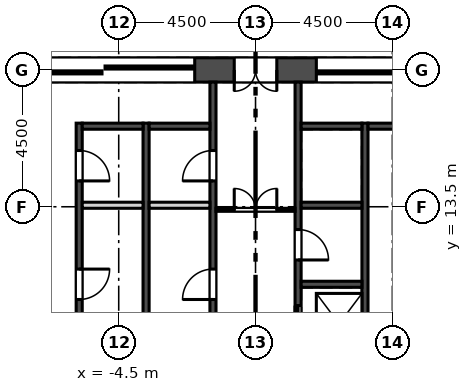
"""IFC4 building model, lengths in metres.
Left out: names, types, materials, properties, quantities, classifications, styles, units other than length and angle.
Written with IfcOpenShell. Run it as: python <this file> out.ifc"""

import sys

from ifc_helpers import new_model, si_unit, direction, frame, frame_2d, origin, place, context, subcontext, project, spatial, rectangle, extrude, element, fill, save


model = new_model("IFC4")
c1 = context("Model", 3, precision=1e-05, world=origin(), true_north=direction((0.0, 1.0)))
c2 = subcontext(c1, "Body", "Model", "MODEL_VIEW")
j1 = project(units=[si_unit("LENGTHUNIT", "METRE"), si_unit("PLANEANGLEUNIT", "RADIAN")], contexts=[c1])
p1 = place(None, origin())
s1 = spatial("IfcSite", under=j1, at=p1, CompositionType="ELEMENT")
p2 = place(p1, origin())
s2 = spatial("IfcBuilding", under=s1, at=p2, CompositionType="ELEMENT")
p3 = place(p2, frame((0.0, 0.0, 335.1)))
s3 = spatial("IfcBuildingStorey", under=s2, at=p3, CompositionType="ELEMENT", Elevation=335.1)
p4 = place(p3, frame((9.065, 18.0, 0.0), z_axis=(0.0, 0.0, 1.0), x_axis=(-1.0, 0.0, 0.0)))
e1 = element("IfcWall", 1, at=p4, inside=s3, PredefinedType="SHEAR", context=c2, shape_type="SweptSolid", body=[
    extrude(rectangle(XDim=18.13, YDim=0.8, at=frame_2d((9.065, 0.0))), origin(), (0.0, 0.0, 1.0), 4.2),
])
p5 = place(p4, frame((8.365, 0.0, 0.0)))
e2 = element("IfcOpeningElement", 2, at=p5, cuts=e1, PredefinedType="OPENING", context=c2, shape_type="SweptSolid", body=[
    extrude(rectangle(XDim=1.4, YDim=2.1, at=frame_2d((0.7, 1.05))), frame((0.0, 0.41, 0.0), z_axis=(0.0, -1.0, 0.0), x_axis=(1.0, 0.0, 0.0)), (0.0, 0.0, 1.0), 0.82),
])
p6 = place(p4, frame((11.065, 0.0, 0.0)))
e3 = element("IfcOpeningElement", 3, at=p6, cuts=e1, PredefinedType="OPENING", context=c2, shape_type="SweptSolid", body=[
    extrude(rectangle(XDim=6.0, YDim=2.4, at=frame_2d((3.0, 1.2))), frame((0.0, 0.41, 0.0), z_axis=(0.0, -1.0, 0.0), x_axis=(1.0, 0.0, 0.0)), (0.0, 0.0, 1.0), 0.82),
])
p7 = place(p4, frame((1.065, 0.0, 0.0)))
e4 = element("IfcOpeningElement", 4, at=p7, cuts=e1, PredefinedType="OPENING", context=c2, shape_type="SweptSolid", body=[
    extrude(rectangle(XDim=6.0, YDim=2.4, at=frame_2d((3.0, 1.2))), frame((0.0, 0.41, 0.0), z_axis=(0.0, -1.0, 0.0), x_axis=(1.0, 0.0, 0.0)), (0.0, 0.0, 1.0), 0.82),
])
p8 = place(p3, frame((23.788, 7.709, 0.0), z_axis=(0.0, 0.0, 1.0), x_axis=(-0.500001731347, 0.866024404189, 0.0)))
e5 = element("IfcWall", 5, at=p8, inside=s3, PredefinedType="SOLIDWALL", context=c2, shape_type="SweptSolid", body=[
    extrude(rectangle(XDim=38.87, YDim=0.34, at=frame_2d((19.435, 0.0))), origin(), (0.0, 0.0, 1.0), 3.8),
])
p9 = place(p8, frame((3.218, 0.0, 0.9)))
e6 = element("IfcOpeningElement", 6, at=p9, cuts=e5, PredefinedType="OPENING", context=c2, shape_type="SweptSolid", body=[
    extrude(rectangle(XDim=1.885, YDim=2.6, at=frame_2d((0.942, 1.3))), frame((0.0, 0.18, 0.0), z_axis=(0.0, -1.0, 0.0), x_axis=(1.0, 0.0, 0.0)), (0.0, 0.0, 1.0), 0.36),
])
p10 = place(p8, frame((6.218, 0.0, 0.9)))
e7 = element("IfcOpeningElement", 7, at=p10, cuts=e5, PredefinedType="OPENING", context=c2, shape_type="SweptSolid", body=[
    extrude(rectangle(XDim=1.885, YDim=2.6, at=frame_2d((0.942, 1.3))), frame((0.0, 0.18, 0.0), z_axis=(0.0, -1.0, 0.0), x_axis=(1.0, 0.0, 0.0)), (0.0, 0.0, 1.0), 0.36),
])
p11 = place(p8, frame((9.218, 0.0, 0.9)))
e8 = element("IfcOpeningElement", 8, at=p11, cuts=e5, PredefinedType="OPENING", context=c2, shape_type="SweptSolid", body=[
    extrude(rectangle(XDim=1.885, YDim=2.6, at=frame_2d((0.942, 1.3))), frame((0.0, 0.18, 0.0), z_axis=(0.0, -1.0, 0.0), x_axis=(1.0, 0.0, 0.0)), (0.0, 0.0, 1.0), 0.36),
])
p12 = place(p8, frame((12.218, 0.0, 0.9)))
e9 = element("IfcOpeningElement", 9, at=p12, cuts=e5, PredefinedType="OPENING", context=c2, shape_type="SweptSolid", body=[
    extrude(rectangle(XDim=1.885, YDim=2.6, at=frame_2d((0.942, 1.3))), frame((0.0, 0.18, 0.0), z_axis=(0.0, -1.0, 0.0), x_axis=(1.0, 0.0, 0.0)), (0.0, 0.0, 1.0), 0.36),
])
p13 = place(p8, frame((15.218, 0.0, 0.9)))
e10 = element("IfcOpeningElement", 10, at=p13, cuts=e5, PredefinedType="OPENING", context=c2, shape_type="SweptSolid", body=[
    extrude(rectangle(XDim=1.885, YDim=2.6, at=frame_2d((0.942, 1.3))), frame((0.0, 0.18, 0.0), z_axis=(0.0, -1.0, 0.0), x_axis=(1.0, 0.0, 0.0)), (0.0, 0.0, 1.0), 0.36),
])
p14 = place(p8, frame((18.218, 0.0, 0.9)))
e11 = element("IfcOpeningElement", 11, at=p14, cuts=e5, PredefinedType="OPENING", context=c2, shape_type="SweptSolid", body=[
    extrude(rectangle(XDim=1.885, YDim=2.6, at=frame_2d((0.942, 1.3))), frame((0.0, 0.18, 0.0), z_axis=(0.0, -1.0, 0.0), x_axis=(1.0, 0.0, 0.0)), (0.0, 0.0, 1.0), 0.36),
])
p15 = place(p8, frame((21.218, 0.0, 0.9)))
e12 = element("IfcOpeningElement", 12, at=p15, cuts=e5, PredefinedType="OPENING", context=c2, shape_type="SweptSolid", body=[
    extrude(rectangle(XDim=1.885, YDim=2.6, at=frame_2d((0.942, 1.3))), frame((0.0, 0.18, 0.0), z_axis=(0.0, -1.0, 0.0), x_axis=(1.0, 0.0, 0.0)), (0.0, 0.0, 1.0), 0.36),
])
p16 = place(p8, frame((24.218, 0.0, 0.9)))
e13 = element("IfcOpeningElement", 13, at=p16, cuts=e5, PredefinedType="OPENING", context=c2, shape_type="SweptSolid", body=[
    extrude(rectangle(XDim=1.885, YDim=2.6, at=frame_2d((0.942, 1.3))), frame((0.0, 0.18, 0.0), z_axis=(0.0, -1.0, 0.0), x_axis=(1.0, 0.0, 0.0)), (0.0, 0.0, 1.0), 0.36),
])
p17 = place(p8, frame((27.218, 0.0, 0.9)))
e14 = element("IfcOpeningElement", 14, at=p17, cuts=e5, PredefinedType="OPENING", context=c2, shape_type="SweptSolid", body=[
    extrude(rectangle(XDim=1.885, YDim=2.6, at=frame_2d((0.942, 1.3))), frame((0.0, 0.18, 0.0), z_axis=(0.0, -1.0, 0.0), x_axis=(1.0, 0.0, 0.0)), (0.0, 0.0, 1.0), 0.36),
])
p18 = place(p8, frame((30.218, 0.0, 0.9)))
e15 = element("IfcOpeningElement", 15, at=p18, cuts=e5, PredefinedType="OPENING", context=c2, shape_type="SweptSolid", body=[
    extrude(rectangle(XDim=1.885, YDim=2.6, at=frame_2d((0.942, 1.3))), frame((0.0, 0.18, 0.0), z_axis=(0.0, -1.0, 0.0), x_axis=(1.0, 0.0, 0.0)), (0.0, 0.0, 1.0), 0.36),
])
p19 = place(p8, frame((33.218, 0.0, 0.9)))
e16 = element("IfcOpeningElement", 16, at=p19, cuts=e5, PredefinedType="OPENING", context=c2, shape_type="SweptSolid", body=[
    extrude(rectangle(XDim=1.885, YDim=2.6, at=frame_2d((0.942, 1.3))), frame((0.0, 0.18, 0.0), z_axis=(0.0, -1.0, 0.0), x_axis=(1.0, 0.0, 0.0)), (0.0, 0.0, 1.0), 0.36),
])
p20 = place(p8, frame((1.051, 0.0, 0.9)))
e17 = element("IfcOpeningElement", 17, at=p20, cuts=e5, PredefinedType="OPENING", context=c2, shape_type="SweptSolid", body=[
    extrude(rectangle(XDim=1.115, YDim=2.4, at=frame_2d((0.558, 1.2))), frame((0.0, 0.18, 0.0), z_axis=(0.0, -1.0, 0.0), x_axis=(1.0, 0.0, 0.0)), (0.0, 0.0, 1.0), 0.36),
])
p21 = place(p8, frame((36.429, 0.0, 0.9)))
e18 = element("IfcOpeningElement", 18, at=p21, cuts=e5, PredefinedType="OPENING", context=c2, shape_type="SweptSolid", body=[
    extrude(rectangle(XDim=1.115, YDim=2.4, at=frame_2d((0.558, 1.2))), frame((0.0, 0.18, 0.0), z_axis=(0.0, -1.0, 0.0), x_axis=(1.0, 0.0, 0.0)), (0.0, 0.0, 1.0), 0.36),
])
p22 = place(p3, frame((-4.353, 41.372, 0.0), z_axis=(0.0, 0.0, 1.0), x_axis=(-0.500001731347, -0.866024404189, 0.0)))
e19 = element("IfcWall", 19, at=p22, inside=s3, PredefinedType="SOLIDWALL", context=c2, shape_type="SweptSolid", body=[
    extrude(rectangle(XDim=38.87, YDim=0.34, at=frame_2d((19.435, 0.0))), origin(), (0.0, 0.0, 1.0), 3.8),
])
p23 = place(p22, frame((3.653, 0.0, 0.9)))
e20 = element("IfcOpeningElement", 20, at=p23, cuts=e19, PredefinedType="OPENING", context=c2, shape_type="SweptSolid", body=[
    extrude(rectangle(XDim=1.885, YDim=2.6, at=frame_2d((0.942, 1.3))), frame((0.0, 0.18, 0.0), z_axis=(0.0, -1.0, 0.0), x_axis=(1.0, 0.0, 0.0)), (0.0, 0.0, 1.0), 0.36),
])
p24 = place(p22, frame((6.653, 0.0, 0.9)))
e21 = element("IfcOpeningElement", 21, at=p24, cuts=e19, PredefinedType="OPENING", context=c2, shape_type="SweptSolid", body=[
    extrude(rectangle(XDim=1.885, YDim=2.6, at=frame_2d((0.942, 1.3))), frame((0.0, 0.18, 0.0), z_axis=(0.0, -1.0, 0.0), x_axis=(1.0, 0.0, 0.0)), (0.0, 0.0, 1.0), 0.36),
])
p25 = place(p22, frame((9.653, 0.0, 0.9)))
e22 = element("IfcOpeningElement", 22, at=p25, cuts=e19, PredefinedType="OPENING", context=c2, shape_type="SweptSolid", body=[
    extrude(rectangle(XDim=1.885, YDim=2.6, at=frame_2d((0.942, 1.3))), frame((0.0, 0.18, 0.0), z_axis=(0.0, -1.0, 0.0), x_axis=(1.0, 0.0, 0.0)), (0.0, 0.0, 1.0), 0.36),
])
p26 = place(p22, frame((12.653, 0.0, 0.9)))
e23 = element("IfcOpeningElement", 23, at=p26, cuts=e19, PredefinedType="OPENING", context=c2, shape_type="SweptSolid", body=[
    extrude(rectangle(XDim=1.885, YDim=2.6, at=frame_2d((0.942, 1.3))), frame((0.0, 0.18, 0.0), z_axis=(0.0, -1.0, 0.0), x_axis=(1.0, 0.0, 0.0)), (0.0, 0.0, 1.0), 0.36),
])
p27 = place(p22, frame((15.653, 0.0, 0.9)))
e24 = element("IfcOpeningElement", 24, at=p27, cuts=e19, PredefinedType="OPENING", context=c2, shape_type="SweptSolid", body=[
    extrude(rectangle(XDim=1.885, YDim=2.6, at=frame_2d((0.942, 1.3))), frame((0.0, 0.18, 0.0), z_axis=(0.0, -1.0, 0.0), x_axis=(1.0, 0.0, 0.0)), (0.0, 0.0, 1.0), 0.36),
])
p28 = place(p22, frame((18.653, 0.0, 0.9)))
e25 = element("IfcOpeningElement", 25, at=p28, cuts=e19, PredefinedType="OPENING", context=c2, shape_type="SweptSolid", body=[
    extrude(rectangle(XDim=1.885, YDim=2.6, at=frame_2d((0.942, 1.3))), frame((0.0, 0.18, 0.0), z_axis=(0.0, -1.0, 0.0), x_axis=(1.0, 0.0, 0.0)), (0.0, 0.0, 1.0), 0.36),
])
p29 = place(p22, frame((21.653, 0.0, 0.9)))
e26 = element("IfcOpeningElement", 26, at=p29, cuts=e19, PredefinedType="OPENING", context=c2, shape_type="SweptSolid", body=[
    extrude(rectangle(XDim=1.885, YDim=2.6, at=frame_2d((0.942, 1.3))), frame((0.0, 0.18, 0.0), z_axis=(0.0, -1.0, 0.0), x_axis=(1.0, 0.0, 0.0)), (0.0, 0.0, 1.0), 0.36),
])
p30 = place(p22, frame((24.653, 0.0, 0.9)))
e27 = element("IfcOpeningElement", 27, at=p30, cuts=e19, PredefinedType="OPENING", context=c2, shape_type="SweptSolid", body=[
    extrude(rectangle(XDim=1.885, YDim=2.6, at=frame_2d((0.942, 1.3))), frame((0.0, 0.18, 0.0), z_axis=(0.0, -1.0, 0.0), x_axis=(1.0, 0.0, 0.0)), (0.0, 0.0, 1.0), 0.36),
])
p31 = place(p22, frame((27.653, 0.0, 0.9)))
e28 = element("IfcOpeningElement", 28, at=p31, cuts=e19, PredefinedType="OPENING", context=c2, shape_type="SweptSolid", body=[
    extrude(rectangle(XDim=1.885, YDim=2.6, at=frame_2d((0.942, 1.3))), frame((0.0, 0.18, 0.0), z_axis=(0.0, -1.0, 0.0), x_axis=(1.0, 0.0, 0.0)), (0.0, 0.0, 1.0), 0.36),
])
p32 = place(p22, frame((30.653, 0.0, 0.9)))
e29 = element("IfcOpeningElement", 29, at=p32, cuts=e19, PredefinedType="OPENING", context=c2, shape_type="SweptSolid", body=[
    extrude(rectangle(XDim=1.885, YDim=2.6, at=frame_2d((0.942, 1.3))), frame((0.0, 0.18, 0.0), z_axis=(0.0, -1.0, 0.0), x_axis=(1.0, 0.0, 0.0)), (0.0, 0.0, 1.0), 0.36),
])
p33 = place(p22, frame((33.653, 0.0, 0.9)))
e30 = element("IfcOpeningElement", 30, at=p33, cuts=e19, PredefinedType="OPENING", context=c2, shape_type="SweptSolid", body=[
    extrude(rectangle(XDim=1.885, YDim=2.6, at=frame_2d((0.942, 1.3))), frame((0.0, 0.18, 0.0), z_axis=(0.0, -1.0, 0.0), x_axis=(1.0, 0.0, 0.0)), (0.0, 0.0, 1.0), 0.36),
])
p34 = place(p22, frame((1.269, 0.0, 0.9)))
e31 = element("IfcOpeningElement", 31, at=p34, cuts=e19, PredefinedType="OPENING", context=c2, shape_type="SweptSolid", body=[
    extrude(rectangle(XDim=1.115, YDim=2.4, at=frame_2d((0.558, 1.2))), frame((0.0, 0.18, 0.0), z_axis=(0.0, -1.0, 0.0), x_axis=(1.0, 0.0, 0.0)), (0.0, 0.0, 1.0), 0.36),
])
p35 = place(p22, frame((36.646, 0.0, 0.9)))
e32 = element("IfcOpeningElement", 32, at=p35, cuts=e19, PredefinedType="OPENING", context=c2, shape_type="SweptSolid", body=[
    extrude(rectangle(XDim=1.115, YDim=2.4, at=frame_2d((0.558, 1.2))), frame((0.0, 0.18, 0.0), z_axis=(0.0, -1.0, 0.0), x_axis=(1.0, 0.0, 0.0)), (0.0, 0.0, 1.0), 0.36),
])
p36 = place(p3, frame((-5.8, 8.25, -0.4), z_axis=(0.0, 0.0, 1.0), x_axis=(0.0, 1.0, 0.0)))
e33 = element("IfcWall", 33, at=p36, inside=s3, PredefinedType="SOLIDWALL", context=c2, shape_type="SweptSolid", body=[
    extrude(rectangle(XDim=8.0, YDim=0.2, at=frame_2d((4.0, 0.0))), origin(), (0.0, 0.0, 1.0), 4.2),
])
p37 = place(p36, frame((2.2, 0.0, 0.4)))
e34 = element("IfcOpeningElement", 34, at=p37, cuts=e33, PredefinedType="OPENING", context=c2, shape_type="SweptSolid", body=[
    extrude(rectangle(XDim=1.0, YDim=2.1, at=frame_2d((0.5, 1.05))), frame((0.0, 0.11, 0.0), z_axis=(0.0, -1.0, 0.0), x_axis=(1.0, 0.0, 0.0)), (0.0, 0.0, 1.0), 0.22),
])
p38 = place(p36, frame((6.1, 0.0, 0.4)))
e35 = element("IfcOpeningElement", 35, at=p38, cuts=e33, PredefinedType="OPENING", context=c2, shape_type="SweptSolid", body=[
    extrude(rectangle(XDim=1.0, YDim=2.1, at=frame_2d((0.5, 1.05))), frame((0.0, 0.11, 0.0), z_axis=(0.0, -1.0, 0.0), x_axis=(1.0, 0.0, 0.0)), (0.0, 0.0, 1.0), 0.22),
])
for number, where, z_axis, x_axis in (
    (36, (-3.6, 8.45, -0.4), (0.0, 0.0, 1.0), (0.0, 1.0, 0.0)),
    (37, (3.6, 8.45, -0.4), (0.0, 0.0, 1.0), (0.0, 1.0, 0.0)),
):
    element("IfcWall", number, at=place(p3, frame(where, z_axis=z_axis, x_axis=x_axis)), inside=s3, PredefinedType="SOLIDWALL", context=c2, shape_type="SweptSolid", body=[
        extrude(rectangle(XDim=7.8, YDim=0.2, at=frame_2d((3.9, 0.0))), origin(), (0.0, 0.0, 1.0), 4.2),
    ])
p39 = place(p3, frame((-1.4, 5.85, -0.4), z_axis=(0.0, 0.0, 1.0), x_axis=(0.0, 1.0, 0.0)))
e38 = element("IfcWall", 38, at=p39, inside=s3, PredefinedType="SOLIDWALL", context=c2, shape_type="SweptSolid", body=[
    extrude(rectangle(XDim=11.75, YDim=0.2, at=frame_2d((5.875, 0.0))), origin(), (0.0, 0.0, 1.0), 4.2),
])
p40 = place(p39, frame((0.65, 0.0, 0.4)))
e39 = element("IfcOpeningElement", 39, at=p40, cuts=e38, PredefinedType="OPENING", context=c2, shape_type="SweptSolid", body=[
    extrude(rectangle(XDim=1.1, YDim=2.1, at=frame_2d((0.55, 1.05))), frame((0.0, 0.11, 0.0), z_axis=(0.0, -1.0, 0.0), x_axis=(1.0, 0.0, 0.0)), (0.0, 0.0, 1.0), 0.22),
])
p41 = place(p39, frame((4.6, 0.0, 0.4)))
e40 = element("IfcOpeningElement", 40, at=p41, cuts=e38, PredefinedType="OPENING", context=c2, shape_type="SweptSolid", body=[
    extrude(rectangle(XDim=1.0, YDim=2.1, at=frame_2d((0.5, 1.05))), frame((0.0, 0.11, 0.0), z_axis=(0.0, -1.0, 0.0), x_axis=(1.0, 0.0, 0.0)), (0.0, 0.0, 1.0), 0.22),
])
p42 = place(p39, frame((8.5, 0.0, 0.4)))
e41 = element("IfcOpeningElement", 41, at=p42, cuts=e38, PredefinedType="OPENING", context=c2, shape_type="SweptSolid", body=[
    extrude(rectangle(XDim=1.0, YDim=2.1, at=frame_2d((0.5, 1.05))), frame((0.0, 0.11, 0.0), z_axis=(0.0, -1.0, 0.0), x_axis=(1.0, 0.0, 0.0)), (0.0, 0.0, 1.0), 0.22),
])
p43 = place(p3, frame((1.4, 5.85, -0.4), z_axis=(0.0, 0.0, 1.0), x_axis=(0.0, 1.0, 0.0)))
e42 = element("IfcWall", 42, at=p43, inside=s3, PredefinedType="SOLIDWALL", context=c2, shape_type="SweptSolid", body=[
    extrude(rectangle(XDim=11.75, YDim=0.2, at=frame_2d((5.875, 0.0))), origin(), (0.0, 0.0, 1.0), 4.2),
])
p44 = place(p43, frame((3.2, 0.0, 0.4)))
e43 = element("IfcOpeningElement", 43, at=p44, cuts=e42, PredefinedType="OPENING", context=c2, shape_type="SweptSolid", body=[
    extrude(rectangle(XDim=1.2, YDim=2.1, at=frame_2d((0.6, 1.05))), frame((0.0, 0.11, 0.0), z_axis=(0.0, -1.0, 0.0), x_axis=(1.0, 0.0, 0.0)), (0.0, 0.0, 1.0), 0.22),
])
p45 = place(p43, frame((0.65, 0.0, 0.4)))
e44 = element("IfcOpeningElement", 44, at=p45, cuts=e42, PredefinedType="OPENING", context=c2, shape_type="SweptSolid", body=[
    extrude(rectangle(XDim=1.1, YDim=2.1, at=frame_2d((0.55, 1.05))), frame((0.0, 0.11, 0.0), z_axis=(0.0, -1.0, 0.0), x_axis=(1.0, 0.0, 0.0)), (0.0, 0.0, 1.0), 0.22),
])
p46 = place(p43, frame((5.9, 0.0, 0.4)))
e45 = element("IfcOpeningElement", 45, at=p46, cuts=e42, PredefinedType="OPENING", context=c2, shape_type="SweptSolid", body=[
    extrude(rectangle(XDim=1.0, YDim=2.1, at=frame_2d((0.5, 1.05))), frame((0.0, 0.11, 0.0), z_axis=(0.0, -1.0, 0.0), x_axis=(1.0, 0.0, 0.0)), (0.0, 0.0, 1.0), 0.22),
])
p47 = place(p3, frame((-5.7, 13.55, 0.0), z_axis=(0.0, 0.0, 1.0), x_axis=(1.0, 0.0, 0.0)))
e46 = element("IfcWall", 46, at=p47, inside=s3, PredefinedType="SOLIDWALL", context=c2, shape_type="SweptSolid", body=[
    extrude(rectangle(XDim=2.0, YDim=0.2, at=frame_2d((1.0, 0.0))), origin(), (0.0, 0.0, 1.0), 3.8),
])
p48 = place(p3, frame((-5.7, 16.15, -0.4), z_axis=(0.0, 0.0, 1.0), x_axis=(1.0, 0.0, 0.0)))
e47 = element("IfcWall", 47, at=p48, inside=s3, PredefinedType="SOLIDWALL", context=c2, shape_type="SweptSolid", body=[
    extrude(rectangle(XDim=2.0, YDim=0.2, at=frame_2d((1.0, 0.0))), origin(), (0.0, 0.0, 1.0), 4.2),
])
p49 = place(p3, frame((-3.5, 13.55, 0.0), z_axis=(0.0, 0.0, 1.0), x_axis=(1.0, 0.0, 0.0)))
e48 = element("IfcWall", 48, at=p49, inside=s3, PredefinedType="SOLIDWALL", context=c2, shape_type="SweptSolid", body=[
    extrude(rectangle(XDim=2.0, YDim=0.2, at=frame_2d((1.0, 0.0))), origin(), (0.0, 0.0, 1.0), 3.8),
])
for number, where, z_axis, x_axis in (
    (49, (-3.5, 16.15, -0.4), (0.0, 0.0, 1.0), (1.0, 0.0, 0.0)),
    (50, (3.7, 16.15, -0.4), (0.0, 0.0, 1.0), (1.0, 0.0, 0.0)),
    (51, (1.5, 10.95, -0.4), (0.0, 0.0, 1.0), (1.0, 0.0, 0.0)),
    (52, (1.5, 13.55, -0.4), (0.0, 0.0, 1.0), (1.0, 0.0, 0.0)),
    (53, (1.5, 16.15, -0.4), (0.0, 0.0, 1.0), (1.0, 0.0, 0.0)),
):
    element("IfcWall", number, at=place(p3, frame(where, z_axis=z_axis, x_axis=x_axis)), inside=s3, PredefinedType="SOLIDWALL", context=c2, shape_type="SweptSolid", body=[
        extrude(rectangle(XDim=2.0, YDim=0.2, at=frame_2d((1.0, 0.0))), origin(), (0.0, 0.0, 1.0), 4.2),
    ])
p50 = place(p3, frame((-1.3, 13.4, 0.0), z_axis=(0.0, 0.0, 1.0), x_axis=(1.0, 0.0, 0.0)))
e54 = element("IfcWall", 54, at=p50, inside=s3, PredefinedType="PARTITIONING", context=c2, shape_type="SweptSolid", body=[
    extrude(rectangle(XDim=2.6, YDim=0.1, at=frame_2d((1.3, 0.0))), origin(), (0.0, 0.0, 1.0), 3.8),
])
p51 = place(p50, frame((0.6, 0.0, 0.0)))
e55 = element("IfcOpeningElement", 55, at=p51, cuts=e54, PredefinedType="OPENING", context=c2, shape_type="SweptSolid", body=[
    extrude(rectangle(XDim=1.4, YDim=2.1, at=frame_2d((0.7, 1.05))), frame((0.0, 0.06, 0.0), z_axis=(0.0, -1.0, 0.0), x_axis=(1.0, 0.0, 0.0)), (0.0, 0.0, 1.0), 0.12),
])
p52 = place(p44, origin())
e56 = element("IfcDoor", 56, at=p52, inside=s3, OperationType="SLIDING_TO_LEFT", PredefinedType="DOOR", context=c2, shape_type="SweptSolid", body=[
    extrude(rectangle(XDim=1.2, YDim=2.1, at=frame_2d((0.6, 1.05))), frame((0.0, 0.025, 0.0), z_axis=(0.0, -1.0, 0.0), x_axis=(1.0, 0.0, 0.0)), (0.0, 0.0, 1.0), 0.05),
])
fill(e43, e56)
p53 = place(p37, frame((1.0, 0.0, 0.0), z_axis=(0.0, 0.0, 1.0), x_axis=(-1.0, 0.0, 0.0)))
e57 = element("IfcDoor", 57, at=p53, inside=s3, OperationType="SINGLE_SWING_LEFT", PredefinedType="DOOR", context=c2, shape_type="SweptSolid", body=[
    extrude(rectangle(XDim=1.0, YDim=2.1, at=frame_2d((0.5, 1.05))), frame((0.0, 0.025, 0.0), z_axis=(0.0, -1.0, 0.0), x_axis=(1.0, 0.0, 0.0)), (0.0, 0.0, 1.0), 0.05),
])
fill(e34, e57)
p54 = place(p38, frame((1.0, 0.0, 0.0), z_axis=(0.0, 0.0, 1.0), x_axis=(-1.0, 0.0, 0.0)))
e58 = element("IfcDoor", 58, at=p54, inside=s3, OperationType="SINGLE_SWING_RIGHT", PredefinedType="DOOR", context=c2, shape_type="SweptSolid", body=[
    extrude(rectangle(XDim=1.0, YDim=2.1, at=frame_2d((0.5, 1.05))), frame((0.0, 0.025, 0.0), z_axis=(0.0, -1.0, 0.0), x_axis=(1.0, 0.0, 0.0)), (0.0, 0.0, 1.0), 0.05),
])
fill(e35, e58)
p55 = place(p41, origin())
e59 = element("IfcDoor", 59, at=p55, inside=s3, OperationType="SINGLE_SWING_LEFT", PredefinedType="DOOR", context=c2, shape_type="SweptSolid", body=[
    extrude(rectangle(XDim=1.0, YDim=2.1, at=frame_2d((0.5, 1.05))), frame((0.0, 0.025, 0.0), z_axis=(0.0, -1.0, 0.0), x_axis=(1.0, 0.0, 0.0)), (0.0, 0.0, 1.0), 0.05),
])
fill(e40, e59)
p56 = place(p42, origin())
e60 = element("IfcDoor", 60, at=p56, inside=s3, OperationType="SINGLE_SWING_LEFT", PredefinedType="DOOR", context=c2, shape_type="SweptSolid", body=[
    extrude(rectangle(XDim=1.0, YDim=2.1, at=frame_2d((0.5, 1.05))), frame((0.0, 0.025, 0.0), z_axis=(0.0, -1.0, 0.0), x_axis=(1.0, 0.0, 0.0)), (0.0, 0.0, 1.0), 0.05),
])
fill(e41, e60)
p57 = place(p46, frame((1.0, 0.0, 0.0), z_axis=(0.0, 0.0, 1.0), x_axis=(-1.0, 0.0, 0.0)))
e61 = element("IfcDoor", 61, at=p57, inside=s3, OperationType="SINGLE_SWING_RIGHT", PredefinedType="DOOR", context=c2, shape_type="SweptSolid", body=[
    extrude(rectangle(XDim=1.0, YDim=2.1, at=frame_2d((0.5, 1.05))), frame((0.0, 0.025, 0.0), z_axis=(0.0, -1.0, 0.0), x_axis=(1.0, 0.0, 0.0)), (0.0, 0.0, 1.0), 0.05),
])
fill(e45, e61)
p58 = place(p51, origin())
e62 = element("IfcDoor", 62, at=p58, inside=s3, OperationType="DOUBLE_DOOR_SINGLE_SWING", PredefinedType="DOOR", context=c2, shape_type="SweptSolid", body=[
    extrude(rectangle(XDim=1.4, YDim=2.1, at=frame_2d((0.7, 1.05))), frame((0.0, 0.025, 0.0), z_axis=(0.0, -1.0, 0.0), x_axis=(1.0, 0.0, 0.0)), (0.0, 0.0, 1.0), 0.05),
])
fill(e55, e62)
p59 = place(p5, origin())
e63 = element("IfcDoor", 63, at=p59, inside=s3, OperationType="DOUBLE_DOOR_SINGLE_SWING", PredefinedType="DOOR", context=c2, shape_type="SweptSolid", body=[
    extrude(rectangle(XDim=1.4, YDim=2.1, at=frame_2d((0.7, 1.05))), frame((0.0, 0.025, 0.0), z_axis=(0.0, -1.0, 0.0), x_axis=(1.0, 0.0, 0.0)), (0.0, 0.0, 1.0), 0.05),
])
fill(e2, e63)
p60 = place(p6, origin())
e64 = element("IfcDoor", 64, at=p60, inside=s3, OperationType="DOUBLE_DOOR_SLIDING", PredefinedType="DOOR", context=c2, shape_type="SweptSolid", body=[
    extrude(rectangle(XDim=6.0, YDim=2.4, at=frame_2d((3.0, 1.2))), frame((0.0, 0.025, 0.0), z_axis=(0.0, -1.0, 0.0), x_axis=(1.0, 0.0, 0.0)), (0.0, 0.0, 1.0), 0.05),
])
fill(e3, e64)
p61 = place(p7, origin())
e65 = element("IfcDoor", 65, at=p61, inside=s3, OperationType="DOUBLE_DOOR_SLIDING", PredefinedType="DOOR", context=c2, shape_type="SweptSolid", body=[
    extrude(rectangle(XDim=6.0, YDim=2.4, at=frame_2d((3.0, 1.2))), frame((0.0, 0.025, 0.0), z_axis=(0.0, -1.0, 0.0), x_axis=(1.0, 0.0, 0.0)), (0.0, 0.0, 1.0), 0.05),
])
fill(e4, e65)
save(model, sys.argv[1])
